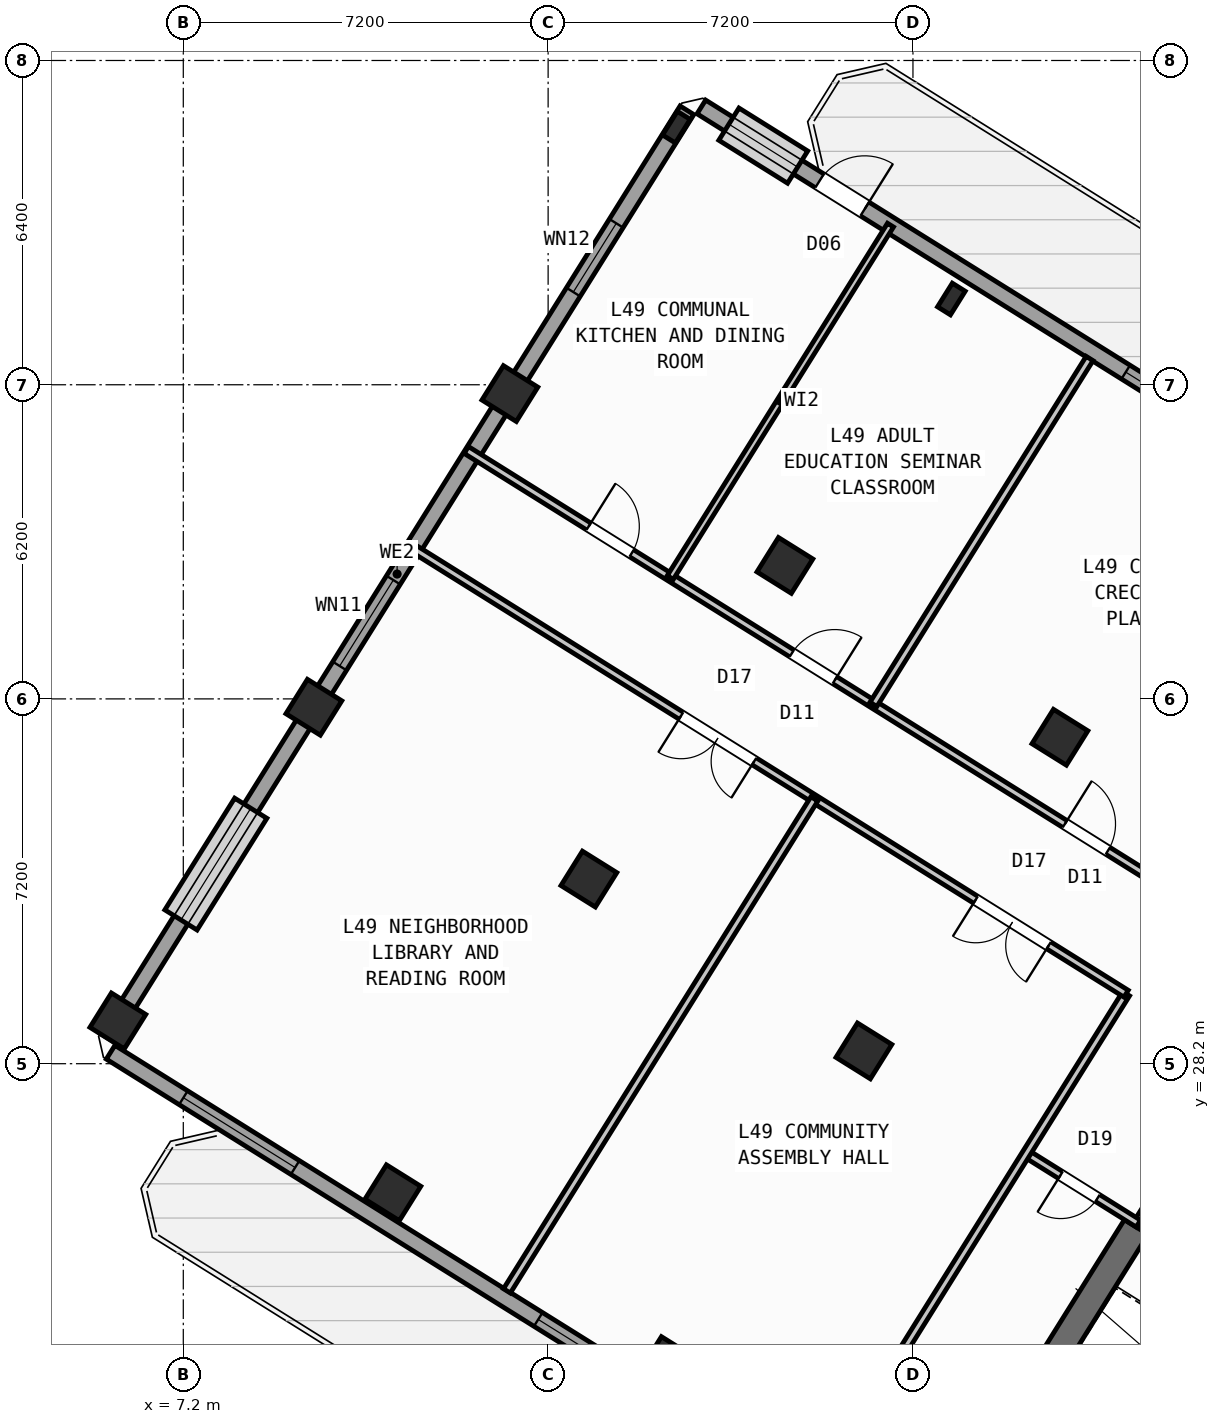
"""IFC4 building model, lengths in metres.
Left out: names, types, materials, properties, quantities, classifications, styles, units other than length and angle.
Written with IfcOpenShell. Run it as: python <this file> out.ifc"""

import sys

from ifc_helpers import new_model, si_unit, direction, frame, frame_2d, origin, origin_2d, place, context, subcontext, project, spatial, rectangle, hollow_rectangle, i_section, extrude, source, transform, mapped, element, fill, save


model = new_model("IFC4")
c1 = context("Model", 3, precision=1e-05, world=origin(), true_north=direction((0.0, 1.0)))
c2 = subcontext(c1, "Body", "Model", "MODEL_VIEW")
j1 = project(units=[si_unit("LENGTHUNIT", "METRE"), si_unit("PLANEANGLEUNIT", "RADIAN")], contexts=[c1])
p1 = place(None, origin())
s1 = spatial("IfcSite", under=j1, at=p1, CompositionType="ELEMENT")
p2 = place(p1, origin())
s2 = spatial("IfcBuilding", under=s1, at=p2, CompositionType="ELEMENT")
p3 = place(p2, frame((0.0, 0.0, 195.0)))
s3 = spatial("IfcBuildingStorey", under=s2, at=p3, CompositionType="ELEMENT", Elevation=195.0)
p4 = place(p3, frame((26.007, 24.976, 0.0), z_axis=(0.0, 0.0, 1.0), x_axis=(-0.529923795287, -0.848045264823, 0.0)))
e1 = element("IfcWall", 1, at=p4, inside=s3, PredefinedType="SHEAR", context=c2, shape_type="SweptSolid", body=[
    extrude(rectangle(XDim=6.425, YDim=0.55, at=frame_2d((3.212, 0.0))), origin(), (0.0, 0.0, 1.0), 4.22),
])
m1 = source(origin(), c2, "Body", "SweptSolid", [
    extrude(hollow_rectangle(XDim=0.8, YDim=0.8, WallThickness=0.032, at=origin_2d()), origin(), (0.0, 0.0, 1.0), 4.5),
])
for number, where, z_axis, x_axis in (
    (2, (24.5, 34.643, 0.0), (0.0, 0.0, 1.0), (-0.848, 0.53, 0.0)),
    (3, (20.632, 28.452, 0.0), (0.0, 0.0, 1.0), (-0.848, 0.53, 0.0)),
    (4, (16.764, 22.261, 0.0), (0.0, 0.0, 1.0), (-0.848, 0.53, 0.0)),
):
    element("IfcColumn", number, at=place(p3, frame(where, z_axis=z_axis, x_axis=x_axis)), inside=s3, PredefinedType="COLUMN", context=c2, shape_type="MappedRepresentation", body=[
        mapped(m1, transform((0.0, 0.0, 0.0), scale=1.0)),
    ])
m2 = source(origin(), c2, "Body", "SweptSolid", [
    extrude(i_section(OverallWidth=0.3, OverallDepth=0.55, WebThickness=0.015, FlangeThickness=0.029, at=origin_2d()), origin(), (0.0, 0.0, 1.0), 4.5),
])
p5 = place(p3, frame((22.358, 43.292, 0.0), z_axis=(0.0, 0.0, 1.0), x_axis=(-0.848048096156, 0.529919264233, 0.0)))
e5 = element("IfcColumn", 5, at=p5, inside=s3, PredefinedType="COLUMN", context=c2, shape_type="MappedRepresentation", body=[
    mapped(m2, transform((0.0, 0.0, 0.0), scale=1.0)),
])
for number, where, z_axis, x_axis in (
    (6, (19.073, 38.034, 0.0), (0.0, 0.0, 1.0), (-0.848, 0.53, 0.0)),
    (7, (15.205, 31.844, 0.0), (0.0, 0.0, 1.0), (-0.848, 0.53, 0.0)),
    (8, (11.336, 25.653, 0.0), (0.0, 0.0, 1.0), (-0.848, 0.53, 0.0)),
):
    element("IfcColumn", number, at=place(p3, frame(where, z_axis=z_axis, x_axis=x_axis)), inside=s3, PredefinedType="COLUMN", context=c2, shape_type="MappedRepresentation", body=[
        mapped(m1, transform((0.0, 0.0, 0.0), scale=1.0)),
    ])
p6 = place(p3, frame((16.931, 46.684, 0.0), z_axis=(0.0, 0.0, 1.0), x_axis=(-0.848048096156, 0.529919264233, 0.0)))
e9 = element("IfcColumn", 9, at=p6, inside=s3, PredefinedType="COLUMN", context=c2, shape_type="MappedRepresentation", body=[
    mapped(m2, transform((0.0, 0.0, 0.0), scale=1.0)),
])
for number, where, z_axis, x_axis in (
    (10, (13.646, 41.426, 0.0), (0.0, 0.0, 1.0), (-0.848, 0.53, 0.0)),
    (11, (9.777, 35.235, 0.0), (0.0, 0.0, 1.0), (-0.848, 0.53, 0.0)),
    (12, (5.909, 29.044, 0.0), (0.0, 0.0, 1.0), (-0.848, 0.53, 0.0)),
):
    element("IfcColumn", number, at=place(p3, frame(where, z_axis=z_axis, x_axis=x_axis)), inside=s3, PredefinedType="COLUMN", context=c2, shape_type="MappedRepresentation", body=[
        mapped(m1, transform((0.0, 0.0, 0.0), scale=1.0)),
    ])
p7 = place(p3, frame((31.76, 12.183, 0.0), z_axis=(0.0, 0.0, 1.0), x_axis=(-0.848047074256, 0.529920899612, 0.0)))
e13 = element("IfcWall", 13, at=p7, inside=s3, PredefinedType="STANDARD", context=c2, shape_type="SweptSolid", body=[
    extrude(rectangle(XDim=30.652, YDim=0.32, at=frame_2d((15.326, 0.0))), origin(), (0.0, 0.0, 1.0), 4.22),
])
p8 = place(p7, frame((15.166, 0.0, 0.0)))
e14 = element("IfcOpeningElement", 14, at=p8, cuts=e13, PredefinedType="OPENING", context=c2, shape_type="SweptSolid", body=[
    extrude(rectangle(XDim=1.2, YDim=2.15, at=frame_2d((0.6, 1.075))), frame((0.0, 0.17, 0.0), z_axis=(0.0, -1.0, 0.0), x_axis=(1.0, 0.0, 0.0)), (0.0, 0.0, 1.0), 0.34),
])
p9 = place(p7, frame((1.765, 0.0, 0.7)))
e15 = element("IfcOpeningElement", 15, at=p9, cuts=e13, PredefinedType="OPENING", context=c2, shape_type="SweptSolid", body=[
    extrude(rectangle(XDim=2.6, YDim=2.0, at=frame_2d((1.3, 1.0))), frame((0.0, 0.17, 0.0), z_axis=(0.0, -1.0, 0.0), x_axis=(1.0, 0.0, 0.0)), (0.0, 0.0, 1.0), 0.34),
])
p10 = place(p7, frame((6.994, 0.0, 0.7)))
e16 = element("IfcOpeningElement", 16, at=p10, cuts=e13, PredefinedType="OPENING", context=c2, shape_type="SweptSolid", body=[
    extrude(rectangle(XDim=2.6, YDim=2.0, at=frame_2d((1.3, 1.0))), frame((0.0, 0.17, 0.0), z_axis=(0.0, -1.0, 0.0), x_axis=(1.0, 0.0, 0.0)), (0.0, 0.0, 1.0), 0.34),
])
p11 = place(p7, frame((19.101, 0.0, 0.85)))
e17 = element("IfcOpeningElement", 17, at=p11, cuts=e13, PredefinedType="OPENING", context=c2, shape_type="SweptSolid", body=[
    extrude(rectangle(XDim=1.6, YDim=1.8, at=frame_2d((0.8, 0.9))), frame((0.0, 0.17, 0.0), z_axis=(0.0, -1.0, 0.0), x_axis=(1.0, 0.0, 0.0)), (0.0, 0.0, 1.0), 0.34),
])
p12 = place(p7, frame((26.358, 0.0, 0.7)))
e18 = element("IfcOpeningElement", 18, at=p12, cuts=e13, PredefinedType="OPENING", context=c2, shape_type="SweptSolid", body=[
    extrude(rectangle(XDim=2.6, YDim=2.0, at=frame_2d((1.3, 1.0))), frame((0.0, 0.17, 0.0), z_axis=(0.0, -1.0, 0.0), x_axis=(1.0, 0.0, 0.0)), (0.0, 0.0, 1.0), 0.34),
])
p13 = place(p3, frame((5.7, 28.71, 0.0), z_axis=(0.0, 0.0, 1.0), x_axis=(0.529923711467, 0.8480453172, 0.0)))
e19 = element("IfcWall", 19, at=p13, inside=s3, PredefinedType="STANDARD", context=c2, shape_type="SweptSolid", body=[
    extrude(rectangle(XDim=21.587, YDim=0.32, at=frame_2d((10.794, 0.0))), origin(), (0.0, 0.0, 1.0), 3.695),
])
p14 = place(p13, frame((2.744, 0.0, 0.7)))
e20 = element("IfcOpeningElement", 20, at=p14, cuts=e19, PredefinedType="OPENING", context=c2, shape_type="SweptSolid", body=[
    extrude(rectangle(XDim=2.6, YDim=2.0, at=frame_2d((1.3, 1.0))), frame((0.0, 0.17, 0.0), z_axis=(0.0, -1.0, 0.0), x_axis=(1.0, 0.0, 0.0)), (0.0, 0.0, 1.0), 0.34),
])
p15 = place(p13, frame((8.654, 0.0, 0.75)))
e21 = element("IfcOpeningElement", 21, at=p15, cuts=e19, PredefinedType="OPENING", context=c2, shape_type="SweptSolid", body=[
    extrude(rectangle(XDim=2.0, YDim=1.95, at=frame_2d((1.0, 0.975))), frame((0.0, 0.17, 0.0), z_axis=(0.0, -1.0, 0.0), x_axis=(1.0, 0.0, 0.0)), (0.0, 0.0, 1.0), 0.34),
])
p16 = place(p13, frame((17.356, 0.0, 0.85)))
e22 = element("IfcOpeningElement", 22, at=p16, cuts=e19, PredefinedType="OPENING", context=c2, shape_type="SweptSolid", body=[
    extrude(rectangle(XDim=1.6, YDim=1.8, at=frame_2d((0.8, 0.9))), frame((0.0, 0.17, 0.0), z_axis=(0.0, -1.0, 0.0), x_axis=(1.0, 0.0, 0.0)), (0.0, 0.0, 1.0), 0.34),
])
p17 = place(p3, frame((17.424, 47.083, 0.0), z_axis=(0.0, 0.0, 1.0), x_axis=(0.848049927979, -0.529916332693, 0.0)))
e23 = element("IfcWall", 23, at=p17, inside=s3, PredefinedType="STANDARD", context=c2, shape_type="SweptSolid", body=[
    extrude(rectangle(XDim=29.223, YDim=0.32, at=frame_2d((14.612, 0.0))), origin(), (0.0, 0.0, 1.0), 4.22),
])
p18 = place(p17, frame((2.752, 0.0, 0.0)))
e24 = element("IfcOpeningElement", 24, at=p18, cuts=e23, PredefinedType="OPENING", context=c2, shape_type="SweptSolid", body=[
    extrude(rectangle(XDim=1.05, YDim=2.15, at=frame_2d((0.525, 1.075))), frame((0.0, 0.17, 0.0), z_axis=(0.0, -1.0, 0.0), x_axis=(1.0, 0.0, 0.0)), (0.0, 0.0, 1.0), 0.34),
])
p19 = place(p17, frame((0.641, 0.0, 0.85)))
e25 = element("IfcOpeningElement", 25, at=p19, cuts=e23, PredefinedType="OPENING", context=c2, shape_type="SweptSolid", body=[
    extrude(rectangle(XDim=1.6, YDim=1.8, at=frame_2d((0.8, 0.9))), frame((0.0, 0.17, 0.0), z_axis=(0.0, -1.0, 0.0), x_axis=(1.0, 0.0, 0.0)), (0.0, 0.0, 1.0), 0.34),
])
p20 = place(p17, frame((9.876, 0.0, 0.75)))
e26 = element("IfcOpeningElement", 26, at=p20, cuts=e23, PredefinedType="OPENING", context=c2, shape_type="SweptSolid", body=[
    extrude(rectangle(XDim=2.0, YDim=1.95, at=frame_2d((1.0, 0.975))), frame((0.0, 0.17, 0.0), z_axis=(0.0, -1.0, 0.0), x_axis=(1.0, 0.0, 0.0)), (0.0, 0.0, 1.0), 0.34),
])
p21 = place(p17, frame((13.674, 0.0, 0.85)))
e27 = element("IfcOpeningElement", 27, at=p21, cuts=e23, PredefinedType="OPENING", context=c2, shape_type="SweptSolid", body=[
    extrude(rectangle(XDim=1.6, YDim=1.8, at=frame_2d((0.8, 0.9))), frame((0.0, 0.17, 0.0), z_axis=(0.0, -1.0, 0.0), x_axis=(1.0, 0.0, 0.0)), (0.0, 0.0, 1.0), 0.34),
])
p22 = place(p3, frame((27.596, 27.52, 0.0), z_axis=(0.0, 0.0, 1.0), x_axis=(-0.529865479138, -0.848081702443, 0.0)))
e28 = element("IfcWall", 28, at=p22, inside=s3, PredefinedType="STANDARD", context=c2, shape_type="SweptSolid", body=[
    extrude(rectangle(XDim=2.96, YDim=0.2, at=frame_2d((1.48, 0.0))), origin(), (0.0, 0.0, 1.0), 4.21),
])
p23 = place(p22, frame((1.76, 0.0, 0.0)))
e29 = element("IfcOpeningElement", 29, at=p23, cuts=e28, PredefinedType="OPENING", context=c2, shape_type="SweptSolid", body=[
    extrude(rectangle(XDim=0.86, YDim=2.05, at=frame_2d((0.43, 1.025))), frame((0.0, 0.11, 0.0), z_axis=(0.0, -1.0, 0.0), x_axis=(1.0, 0.0, 0.0)), (0.0, 0.0, 1.0), 0.22),
])
p24 = place(p3, frame((26.049, 25.044, 0.0), z_axis=(0.0, 0.0, 1.0), x_axis=(-0.848050851465, 0.529914854792, 0.0)))
e30 = element("IfcWall", 30, at=p24, inside=s3, PredefinedType="PARTITIONING", context=c2, shape_type="SweptSolid", body=[
    extrude(rectangle(XDim=2.61, YDim=0.16, at=frame_2d((1.305, 0.0))), origin(), (0.0, 0.0, 1.0), 3.695),
])
p25 = place(p24, frame((0.95, 0.0, 0.0)))
e31 = element("IfcOpeningElement", 31, at=p25, cuts=e30, PredefinedType="OPENING", context=c2, shape_type="SweptSolid", body=[
    extrude(rectangle(XDim=0.86, YDim=2.05, at=frame_2d((0.43, 1.025))), frame((0.0, 0.09, 0.0), z_axis=(0.0, -1.0, 0.0), x_axis=(1.0, 0.0, 0.0)), (0.0, 0.0, 1.0), 0.18),
])
p26 = place(p3, frame((25.807, 29.582, 0.0), z_axis=(0.0, 0.0, 1.0), x_axis=(-0.529920357077, -0.848047413271, 0.0)))
e32 = element("IfcWall", 32, at=p26, inside=s3, PredefinedType="PARTITIONING", context=c2, shape_type="SweptSolid", body=[
    extrude(rectangle(XDim=11.45, YDim=0.16, at=frame_2d((5.725, 0.0))), origin(), (0.0, 0.0, 1.0), 4.21),
])
p27 = place(p3, frame((26.973, 31.447, 0.0), z_axis=(0.0, 0.0, 1.0), x_axis=(-0.848048310262, 0.529918921593, 0.0)))
e33 = element("IfcWall", 33, at=p27, inside=s3, PredefinedType="PARTITIONING", context=c2, shape_type="SweptSolid", body=[
    extrude(rectangle(XDim=16.73, YDim=0.16, at=frame_2d((8.365, 0.0))), origin(), (0.0, 0.0, 1.0), 4.21),
])
p28 = place(p27, frame((1.8, 0.0, 0.0)))
e34 = element("IfcOpeningElement", 34, at=p28, cuts=e33, PredefinedType="OPENING", context=c2, shape_type="SweptSolid", body=[
    extrude(rectangle(XDim=1.0, YDim=2.1, at=frame_2d((0.5, 1.05))), frame((0.0, 0.09, 0.0), z_axis=(0.0, -1.0, 0.0), x_axis=(1.0, 0.0, 0.0)), (0.0, 0.0, 1.0), 0.18),
])
p29 = place(p27, frame((8.155, 0.0, 0.0)))
e35 = element("IfcOpeningElement", 35, at=p29, cuts=e33, PredefinedType="OPENING", context=c2, shape_type="SweptSolid", body=[
    extrude(rectangle(XDim=1.0, YDim=2.1, at=frame_2d((0.5, 1.05))), frame((0.0, 0.09, 0.0), z_axis=(0.0, -1.0, 0.0), x_axis=(1.0, 0.0, 0.0)), (0.0, 0.0, 1.0), 0.18),
])
p30 = place(p27, frame((12.882, 0.0, 0.0)))
e36 = element("IfcOpeningElement", 36, at=p30, cuts=e33, PredefinedType="OPENING", context=c2, shape_type="SweptSolid", body=[
    extrude(rectangle(XDim=1.0, YDim=2.1, at=frame_2d((0.5, 1.05))), frame((0.0, 0.09, 0.0), z_axis=(0.0, -1.0, 0.0), x_axis=(1.0, 0.0, 0.0)), (0.0, 0.0, 1.0), 0.18),
])
p31 = place(p3, frame((25.807, 29.582, 0.0), z_axis=(0.0, 0.0, 1.0), x_axis=(-0.848052408131, 0.529912363569, 0.0)))
e37 = element("IfcWall", 37, at=p31, inside=s3, PredefinedType="PARTITIONING", context=c2, shape_type="SweptSolid", body=[
    extrude(rectangle(XDim=16.73, YDim=0.16, at=frame_2d((8.365, 0.0))), origin(), (0.0, 0.0, 1.0), 4.21),
])
p32 = place(p31, frame((1.8, 0.0, 0.0)))
e38 = element("IfcOpeningElement", 38, at=p32, cuts=e37, PredefinedType="OPENING", context=c2, shape_type="SweptSolid", body=[
    extrude(rectangle(XDim=1.7, YDim=2.2, at=frame_2d((0.85, 1.1))), frame((0.0, 0.09, 0.0), z_axis=(0.0, -1.0, 0.0), x_axis=(1.0, 0.0, 0.0)), (0.0, 0.0, 1.0), 0.18),
])
p33 = place(p31, frame((8.655, 0.0, 0.0)))
e39 = element("IfcOpeningElement", 39, at=p33, cuts=e37, PredefinedType="OPENING", context=c2, shape_type="SweptSolid", body=[
    extrude(rectangle(XDim=1.7, YDim=2.2, at=frame_2d((0.85, 1.1))), frame((0.0, 0.09, 0.0), z_axis=(0.0, -1.0, 0.0), x_axis=(1.0, 0.0, 0.0)), (0.0, 0.0, 1.0), 0.18),
])
p34 = place(p3, frame((19.654, 33.426, 0.0), z_axis=(0.0, 0.0, 1.0), x_axis=(-0.529920357077, -0.848047413271, 0.0)))
e40 = element("IfcWall", 40, at=p34, inside=s3, PredefinedType="PARTITIONING", context=c2, shape_type="SweptSolid", body=[
    extrude(rectangle(XDim=11.45, YDim=0.16, at=frame_2d((5.725, 0.0))), origin(), (0.0, 0.0, 1.0), 4.21),
])
p35 = place(p3, frame((25.086, 42.118, 0.0), z_axis=(0.0, 0.0, 1.0), x_axis=(-0.529928058306, -0.848042600947, 0.0)))
e41 = element("IfcWall", 41, at=p35, inside=s3, PredefinedType="PARTITIONING", context=c2, shape_type="SweptSolid", body=[
    extrude(rectangle(XDim=8.05, YDim=0.16, at=frame_2d((4.025, 0.0))), origin(), (0.0, 0.0, 1.0), 4.21),
])
p36 = place(p3, frame((21.157, 44.751, 0.0), z_axis=(0.0, 0.0, 1.0), x_axis=(-0.529924004437, -0.84804513413, 0.0)))
e42 = element("IfcWall", 42, at=p36, inside=s3, PredefinedType="PLUMBINGWALL", context=c2, shape_type="SweptSolid", body=[
    extrude(rectangle(XDim=8.2, YDim=0.14, at=frame_2d((4.1, 0.0))), origin(), (0.0, 0.0, 1.0), 4.21),
])
m3 = source(origin(), c2, "Body", "SweptSolid", [
    extrude(rectangle(XDim=1.05, YDim=2.15, at=frame_2d((0.525, 1.075))), frame((0.0, 0.025, 0.0), z_axis=(0.0, -1.0, 0.0), x_axis=(1.0, 0.0, 0.0)), (0.0, 0.0, 1.0), 0.05),
])
p37 = place(p18, origin())
e43 = element("IfcDoor", 43, at=p37, inside=s3, OperationType="SINGLE_SWING_RIGHT", PredefinedType="DOOR", context=c2, shape_type="MappedRepresentation", body=[
    mapped(m3, transform((0.0, 0.0, 0.0), scale=1.0)),
])
fill(e24, e43)
m4 = source(origin(), c2, "Body", "SweptSolid", [
    extrude(rectangle(XDim=1.6, YDim=1.8, at=frame_2d((0.8, 0.9))), frame((0.0, 0.03, 0.0), z_axis=(0.0, -1.0, 0.0), x_axis=(1.0, 0.0, 0.0)), (0.0, 0.0, 1.0), 0.06),
])
p38 = place(p11, origin())
e44 = element("IfcWindow", 44, at=p38, inside=s3, PartitioningType="SINGLE_PANEL", PredefinedType="WINDOW", context=c2, shape_type="MappedRepresentation", body=[
    mapped(m4, transform((0.0, 0.0, 0.0), scale=1.0)),
])
fill(e17, e44)
m5 = source(origin(), c2, "Body", "SweptSolid", [
    extrude(rectangle(XDim=2.6, YDim=2.0, at=frame_2d((1.3, 1.0))), frame((0.0, 0.03, 0.0), z_axis=(0.0, -1.0, 0.0), x_axis=(1.0, 0.0, 0.0)), (0.0, 0.0, 1.0), 0.06),
])
p39 = place(p12, origin())
e45 = element("IfcWindow", 45, at=p39, inside=s3, PartitioningType="SINGLE_PANEL", PredefinedType="WINDOW", context=c2, shape_type="MappedRepresentation", body=[
    mapped(m5, transform((0.0, 0.0, 0.0), scale=1.0)),
])
fill(e18, e45)
p40 = place(p14, origin())
e46 = element("IfcWindow", 46, at=p40, inside=s3, PartitioningType="SINGLE_PANEL", PredefinedType="WINDOW", context=c2, shape_type="MappedRepresentation", body=[
    mapped(m5, transform((0.0, 0.0, 0.0), scale=1.0)),
])
fill(e20, e46)
m6 = source(origin(), c2, "Body", "SweptSolid", [
    extrude(rectangle(XDim=2.0, YDim=1.95, at=frame_2d((1.0, 0.975))), frame((0.0, 0.03, 0.0), z_axis=(0.0, -1.0, 0.0), x_axis=(1.0, 0.0, 0.0)), (0.0, 0.0, 1.0), 0.06),
])
p41 = place(p15, origin())
e47 = element("IfcWindow", 47, at=p41, inside=s3, PartitioningType="SINGLE_PANEL", PredefinedType="WINDOW", context=c2, shape_type="MappedRepresentation", body=[
    mapped(m6, transform((0.0, 0.0, 0.0), scale=1.0)),
])
fill(e21, e47)
p42 = place(p16, origin())
e48 = element("IfcWindow", 48, at=p42, inside=s3, PartitioningType="SINGLE_PANEL", PredefinedType="WINDOW", context=c2, shape_type="MappedRepresentation", body=[
    mapped(m4, transform((0.0, 0.0, 0.0), scale=1.0)),
])
fill(e22, e48)
p43 = place(p19, origin())
e49 = element("IfcWindow", 49, at=p43, inside=s3, PartitioningType="SINGLE_PANEL", PredefinedType="WINDOW", context=c2, shape_type="MappedRepresentation", body=[
    mapped(m4, transform((0.0, 0.0, 0.0), scale=1.0)),
])
fill(e25, e49)
p44 = place(p20, origin())
e50 = element("IfcWindow", 50, at=p44, inside=s3, PartitioningType="SINGLE_PANEL", PredefinedType="WINDOW", context=c2, shape_type="MappedRepresentation", body=[
    mapped(m6, transform((0.0, 0.0, 0.0), scale=1.0)),
])
fill(e26, e50)
m7 = source(origin(), c2, "Body", "SweptSolid", [
    extrude(rectangle(XDim=0.86, YDim=2.05, at=frame_2d((0.43, 1.025))), frame((0.0, 0.025, 0.0), z_axis=(0.0, -1.0, 0.0), x_axis=(1.0, 0.0, 0.0)), (0.0, 0.0, 1.0), 0.05),
])
p45 = place(p25, origin())
e51 = element("IfcDoor", 51, at=p45, inside=s3, OperationType="SINGLE_SWING_RIGHT", PredefinedType="DOOR", context=c2, shape_type="MappedRepresentation", body=[
    mapped(m7, transform((0.0, 0.0, 0.0), scale=1.0)),
])
fill(e31, e51)
m8 = source(origin(), c2, "Body", "SweptSolid", [
    extrude(rectangle(XDim=1.7, YDim=2.2, at=frame_2d((0.85, 1.1))), frame((0.0, 0.025, 0.0), z_axis=(0.0, -1.0, 0.0), x_axis=(1.0, 0.0, 0.0)), (0.0, 0.0, 1.0), 0.05),
])
p46 = place(p32, origin())
e52 = element("IfcDoor", 52, at=p46, inside=s3, OperationType="DOUBLE_DOOR_SINGLE_SWING", PredefinedType="DOOR", context=c2, shape_type="MappedRepresentation", body=[
    mapped(m8, transform((0.0, 0.0, 0.0), scale=1.0)),
])
fill(e38, e52)
p47 = place(p33, origin())
e53 = element("IfcDoor", 53, at=p47, inside=s3, OperationType="DOUBLE_DOOR_SINGLE_SWING", PredefinedType="DOOR", context=c2, shape_type="MappedRepresentation", body=[
    mapped(m8, transform((0.0, 0.0, 0.0), scale=1.0)),
])
fill(e39, e53)
m9 = source(origin(), c2, "Body", "SweptSolid", [
    extrude(rectangle(XDim=1.0, YDim=2.1, at=frame_2d((0.5, 1.05))), frame((0.0, 0.025, 0.0), z_axis=(0.0, -1.0, 0.0), x_axis=(1.0, 0.0, 0.0)), (0.0, 0.0, 1.0), 0.05),
])
p48 = place(p28, frame((1.0, 0.0, 0.0), z_axis=(0.0, 0.0, 1.0), x_axis=(-1.0, 0.0, 0.0)))
e54 = element("IfcDoor", 54, at=p48, inside=s3, OperationType="SINGLE_SWING_LEFT", PredefinedType="DOOR", context=c2, shape_type="MappedRepresentation", body=[
    mapped(m9, transform((0.0, 0.0, 0.0), scale=1.0)),
])
fill(e34, e54)
p49 = place(p29, frame((1.0, 0.0, 0.0), z_axis=(0.0, 0.0, 1.0), x_axis=(-1.0, 0.0, 0.0)))
e55 = element("IfcDoor", 55, at=p49, inside=s3, OperationType="SINGLE_SWING_RIGHT", PredefinedType="DOOR", context=c2, shape_type="MappedRepresentation", body=[
    mapped(m9, transform((0.0, 0.0, 0.0), scale=1.0)),
])
fill(e35, e55)
p50 = place(p30, frame((1.0, 0.0, 0.0), z_axis=(0.0, 0.0, 1.0), x_axis=(-1.0, 0.0, 0.0)))
e56 = element("IfcDoor", 56, at=p50, inside=s3, OperationType="SINGLE_SWING_LEFT", PredefinedType="DOOR", context=c2, shape_type="MappedRepresentation", body=[
    mapped(m9, transform((0.0, 0.0, 0.0), scale=1.0)),
])
fill(e36, e56)
save(model, sys.argv[1])
